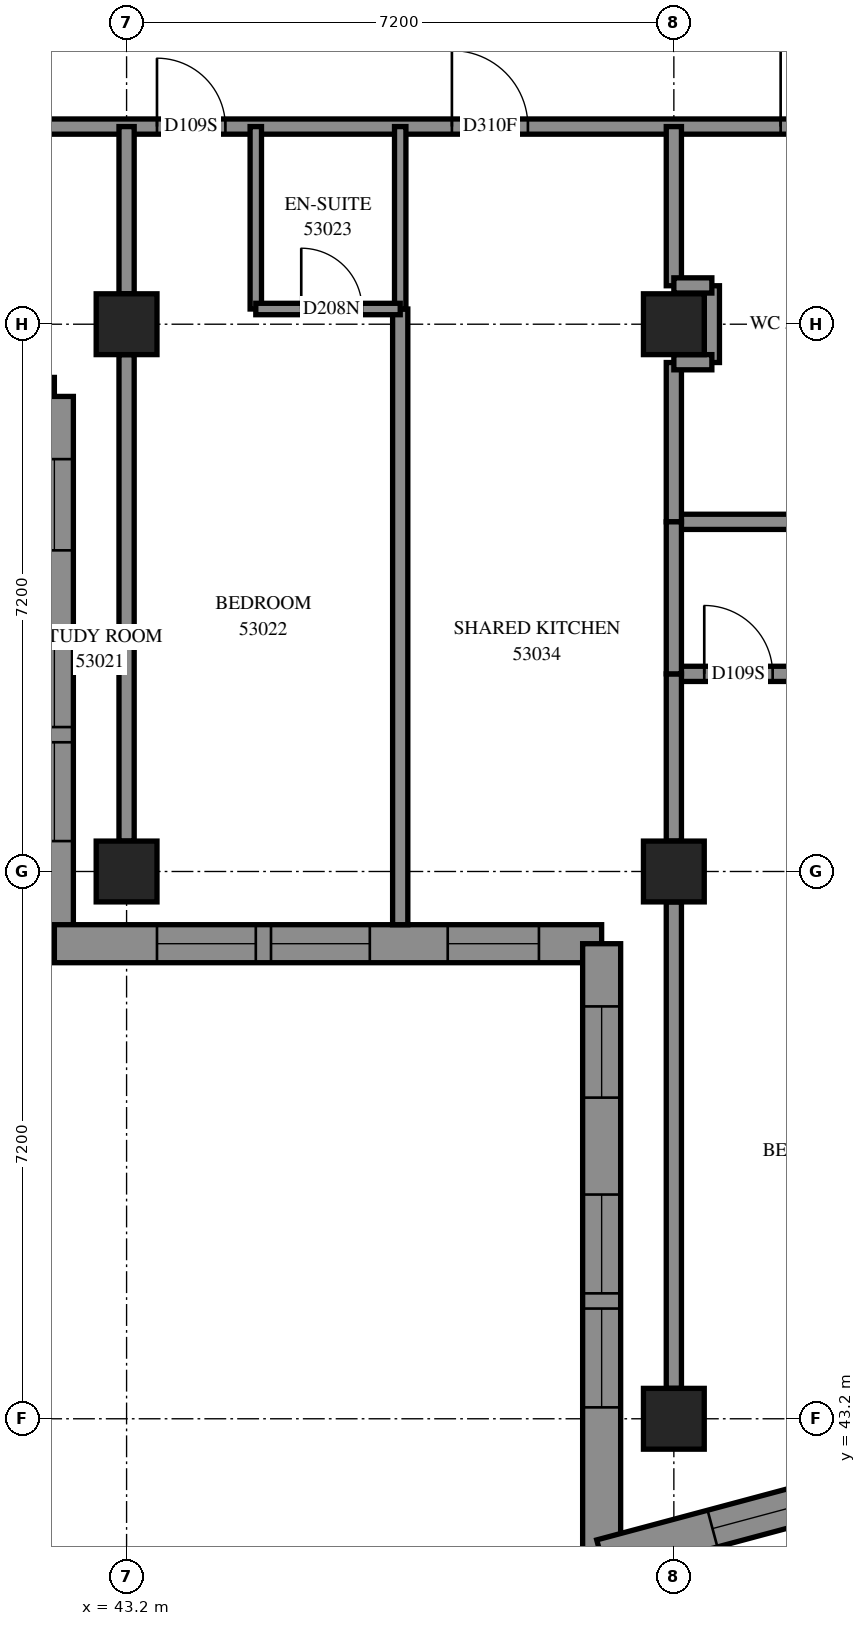
"""IFC4 building model, lengths in metres.
Left out: names, types, materials, properties, quantities, classifications, styles, units other than length and angle.
Written with IfcOpenShell. Run it as: python <this file> out.ifc"""

import sys

from ifc_helpers import new_model, si_unit, direction, frame, frame_2d, origin, origin_2d, place, context, subcontext, project, spatial, polyline, rectangle, outline, extrude, element, fill, save


model = new_model("IFC4")
c1 = context("Model", 3, precision=1e-05, world=origin(), true_north=direction((0.0, 1.0)))
c2 = subcontext(c1, "Body", "Model", "MODEL_VIEW")
j1 = project(units=[si_unit("LENGTHUNIT", "METRE"), si_unit("PLANEANGLEUNIT", "RADIAN")], contexts=[c1])
p1 = place(None, origin())
s1 = spatial("IfcSite", under=j1, at=p1, CompositionType="ELEMENT")
p2 = place(p1, origin())
s2 = spatial("IfcBuilding", under=s1, at=p2, CompositionType="ELEMENT")
p3 = place(p2, frame((0.0, 0.0, 196.4)))
s3 = spatial("IfcBuildingStorey", under=s2, at=p3, CompositionType="ELEMENT", Elevation=196.4)
for number, where, z_axis, x_axis in (
    (1, (43.2, 50.4, 0.0), (0.0, 0.0, 1.0), (1.0, 0.0, 0.0)),
    (2, (43.2, 57.6, 0.0), (0.0, 0.0, 1.0), (1.0, 0.0, 0.0)),
    (3, (50.4, 43.2, 0.0), (0.0, 0.0, 1.0), (1.0, 0.0, 0.0)),
    (4, (50.4, 50.4, 0.0), (0.0, 0.0, 1.0), (1.0, 0.0, 0.0)),
    (5, (50.4, 57.6, 0.0), (0.0, 0.0, 1.0), (1.0, 0.0, 0.0)),
):
    element("IfcColumn", number, at=place(p3, frame(where, z_axis=z_axis, x_axis=x_axis)), inside=s3, PredefinedType="COLUMN", context=c2, shape_type="SweptSolid", body=[
        extrude(rectangle(XDim=0.8, YDim=0.8, at=origin_2d()), origin(), (0.0, 0.0, 1.0), 3.1),
    ])
p4 = place(p3, frame((35.05, 56.65, 0.0), z_axis=(0.0, 0.0, 1.0), x_axis=(1.0, 0.0, 0.0)))
e6 = element("IfcWall", 6, at=p4, inside=s3, PredefinedType="SOLIDWALL", context=c2, shape_type="SweptSolid", body=[
    extrude(outline(polyline([(-0.25, -0.25), (6.95, -0.25), (7.45, 0.25), (0.25, 0.25), (-0.25, -0.25)])), origin(), (0.0, 0.0, 1.0), 3.1),
])
p5 = place(p4, frame((1.35, 0.0, 0.45)))
e7 = element("IfcOpeningElement", 7, at=p5, cuts=e6, PredefinedType="OPENING", context=c2, shape_type="SweptSolid", body=[
    extrude(rectangle(XDim=1.3, YDim=2.5, at=frame_2d((0.65, 1.25))), frame((0.0, 0.26, 0.0), z_axis=(0.0, -1.0, 0.0), x_axis=(1.0, 0.0, 0.0)), (0.0, 0.0, 1.0), 0.52),
])
p6 = place(p4, frame((2.85, 0.0, 0.45)))
e8 = element("IfcOpeningElement", 8, at=p6, cuts=e6, PredefinedType="OPENING", context=c2, shape_type="SweptSolid", body=[
    extrude(rectangle(XDim=1.3, YDim=2.5, at=frame_2d((0.65, 1.25))), frame((0.0, 0.26, 0.0), z_axis=(0.0, -1.0, 0.0), x_axis=(1.0, 0.0, 0.0)), (0.0, 0.0, 1.0), 0.52),
])
p7 = place(p4, frame((5.175, 0.0, 0.45)))
e9 = element("IfcOpeningElement", 9, at=p7, cuts=e6, PredefinedType="OPENING", context=c2, shape_type="SweptSolid", body=[
    extrude(rectangle(XDim=1.2, YDim=2.5, at=frame_2d((0.6, 1.25))), frame((0.0, 0.26, 0.0), z_axis=(0.0, -1.0, 0.0), x_axis=(1.0, 0.0, 0.0)), (0.0, 0.0, 1.0), 0.52),
])
p8 = place(p3, frame((42.25, 56.65, 0.0), z_axis=(0.0, 0.0, 1.0), x_axis=(0.0, -1.0, 0.0)))
e10 = element("IfcWall", 10, at=p8, inside=s3, PredefinedType="SOLIDWALL", context=c2, shape_type="SweptSolid", body=[
    extrude(outline(polyline([(0.25, -0.25), (7.45, -0.25), (6.95, 0.25), (-0.25, 0.25), (0.25, -0.25)])), origin(), (0.0, 0.0, 1.0), 3.1),
])
p9 = place(p8, frame((3.05, 0.0, 0.45)))
e11 = element("IfcOpeningElement", 11, at=p9, cuts=e10, PredefinedType="OPENING", context=c2, shape_type="SweptSolid", body=[
    extrude(rectangle(XDim=1.3, YDim=2.5, at=frame_2d((0.65, 1.25))), frame((0.0, 0.26, 0.0), z_axis=(0.0, -1.0, 0.0), x_axis=(1.0, 0.0, 0.0)), (0.0, 0.0, 1.0), 0.52),
])
p10 = place(p8, frame((4.55, 0.0, 0.45)))
e12 = element("IfcOpeningElement", 12, at=p10, cuts=e10, PredefinedType="OPENING", context=c2, shape_type="SweptSolid", body=[
    extrude(rectangle(XDim=1.3, YDim=2.5, at=frame_2d((0.65, 1.25))), frame((0.0, 0.26, 0.0), z_axis=(0.0, -1.0, 0.0), x_axis=(1.0, 0.0, 0.0)), (0.0, 0.0, 1.0), 0.52),
])
p11 = place(p8, frame((0.825, 0.0, 0.45)))
e13 = element("IfcOpeningElement", 13, at=p11, cuts=e10, PredefinedType="OPENING", context=c2, shape_type="SweptSolid", body=[
    extrude(rectangle(XDim=1.2, YDim=2.5, at=frame_2d((0.6, 1.25))), frame((0.0, 0.26, 0.0), z_axis=(0.0, -1.0, 0.0), x_axis=(1.0, 0.0, 0.0)), (0.0, 0.0, 1.0), 0.52),
])
p12 = place(p3, frame((42.25, 49.45, 0.0), z_axis=(0.0, 0.0, 1.0), x_axis=(1.0, 0.0, 0.0)))
e14 = element("IfcWall", 14, at=p12, inside=s3, PredefinedType="SOLIDWALL", context=c2, shape_type="SweptSolid", body=[
    extrude(outline(polyline([(-0.25, -0.25), (6.95, -0.25), (7.45, 0.25), (0.25, 0.25), (-0.25, -0.25)])), origin(), (0.0, 0.0, 1.0), 3.1),
])
p13 = place(p12, frame((1.35, 0.0, 0.45)))
e15 = element("IfcOpeningElement", 15, at=p13, cuts=e14, PredefinedType="OPENING", context=c2, shape_type="SweptSolid", body=[
    extrude(rectangle(XDim=1.3, YDim=2.5, at=frame_2d((0.65, 1.25))), frame((0.0, 0.26, 0.0), z_axis=(0.0, -1.0, 0.0), x_axis=(1.0, 0.0, 0.0)), (0.0, 0.0, 1.0), 0.52),
])
p14 = place(p12, frame((2.85, 0.0, 0.45)))
e16 = element("IfcOpeningElement", 16, at=p14, cuts=e14, PredefinedType="OPENING", context=c2, shape_type="SweptSolid", body=[
    extrude(rectangle(XDim=1.3, YDim=2.5, at=frame_2d((0.65, 1.25))), frame((0.0, 0.26, 0.0), z_axis=(0.0, -1.0, 0.0), x_axis=(1.0, 0.0, 0.0)), (0.0, 0.0, 1.0), 0.52),
])
p15 = place(p12, frame((5.175, 0.0, 0.45)))
e17 = element("IfcOpeningElement", 17, at=p15, cuts=e14, PredefinedType="OPENING", context=c2, shape_type="SweptSolid", body=[
    extrude(rectangle(XDim=1.2, YDim=2.5, at=frame_2d((0.6, 1.25))), frame((0.0, 0.26, 0.0), z_axis=(0.0, -1.0, 0.0), x_axis=(1.0, 0.0, 0.0)), (0.0, 0.0, 1.0), 0.52),
])
p16 = place(p3, frame((49.45, 49.45, 0.0), z_axis=(0.0, 0.0, 1.0), x_axis=(0.0, -1.0, 0.0)))
e18 = element("IfcWall", 18, at=p16, inside=s3, PredefinedType="SOLIDWALL", context=c2, shape_type="SweptSolid", body=[
    extrude(outline(polyline([(0.25, -0.25), (8.411, -0.25), (7.76, 0.25), (-0.25, 0.25), (0.25, -0.25)])), origin(), (0.0, 0.0, 1.0), 3.1),
])
p17 = place(p16, frame((3.3, 0.0, 0.45)))
e19 = element("IfcOpeningElement", 19, at=p17, cuts=e18, PredefinedType="OPENING", context=c2, shape_type="SweptSolid", body=[
    extrude(rectangle(XDim=1.3, YDim=2.5, at=frame_2d((0.65, 1.25))), frame((0.0, 0.26, 0.0), z_axis=(0.0, -1.0, 0.0), x_axis=(1.0, 0.0, 0.0)), (0.0, 0.0, 1.0), 0.52),
])
p18 = place(p16, frame((4.8, 0.0, 0.45)))
e20 = element("IfcOpeningElement", 20, at=p18, cuts=e18, PredefinedType="OPENING", context=c2, shape_type="SweptSolid", body=[
    extrude(rectangle(XDim=1.3, YDim=2.5, at=frame_2d((0.65, 1.25))), frame((0.0, 0.26, 0.0), z_axis=(0.0, -1.0, 0.0), x_axis=(1.0, 0.0, 0.0)), (0.0, 0.0, 1.0), 0.52),
])
p19 = place(p16, frame((0.825, 0.0, 0.45)))
e21 = element("IfcOpeningElement", 21, at=p19, cuts=e18, PredefinedType="OPENING", context=c2, shape_type="SweptSolid", body=[
    extrude(rectangle(XDim=1.2, YDim=2.5, at=frame_2d((0.6, 1.25))), frame((0.0, 0.26, 0.0), z_axis=(0.0, -1.0, 0.0), x_axis=(1.0, 0.0, 0.0)), (0.0, 0.0, 1.0), 0.52),
])
p20 = place(p3, frame((49.45, 41.365, 0.0), z_axis=(0.0, 0.0, 1.0), x_axis=(0.9659803862, 0.2586153388, 0.0)))
e22 = element("IfcWall", 22, at=p20, inside=s3, PredefinedType="SOLIDWALL", context=c2, shape_type="SweptSolid", body=[
    extrude(outline(polyline([(-0.326, -0.25), (3.39, -0.25), (3.482, 0.25), (0.326, 0.25), (-0.326, -0.25)])), origin(), (0.0, 0.0, 1.0), 3.1),
])
p21 = place(p20, frame((1.51, 0.0, 0.45)))
e23 = element("IfcOpeningElement", 23, at=p21, cuts=e22, PredefinedType="OPENING", context=c2, shape_type="SweptSolid", body=[
    extrude(rectangle(XDim=1.2, YDim=2.5, at=frame_2d((0.6, 1.25))), frame((0.0, 0.26, 0.0), z_axis=(0.0, -1.0, 0.0), x_axis=(1.0, 0.0, 0.0)), (0.0, 0.0, 1.0), 0.52),
])
p22 = place(p3, frame((36.0, 60.2, 0.0), z_axis=(0.0, 0.0, 1.0), x_axis=(1.0, 0.0, 0.0)))
e24 = element("IfcWall", 24, at=p22, inside=s3, PredefinedType="PARTITIONING", context=c2, shape_type="SweptSolid", body=[
    extrude(rectangle(XDim=17.0, YDim=0.2, at=frame_2d((8.5, 0.0))), origin(), (0.0, 0.0, 1.0), 3.1),
])
p23 = place(p22, frame((4.125, 0.0, 0.0)))
e25 = element("IfcOpeningElement", 25, at=p23, cuts=e24, PredefinedType="OPENING", context=c2, shape_type="SweptSolid", body=[
    extrude(rectangle(XDim=1.0, YDim=2.1, at=frame_2d((0.5, 1.05))), frame((0.0, 0.11, 0.0), z_axis=(0.0, -1.0, 0.0), x_axis=(1.0, 0.0, 0.0)), (0.0, 0.0, 1.0), 0.22),
])
p24 = place(p22, frame((7.6, 0.0, 0.0)))
e26 = element("IfcOpeningElement", 26, at=p24, cuts=e24, PredefinedType="OPENING", context=c2, shape_type="SweptSolid", body=[
    extrude(rectangle(XDim=0.9, YDim=2.1, at=frame_2d((0.45, 1.05))), frame((0.0, 0.11, 0.0), z_axis=(0.0, -1.0, 0.0), x_axis=(1.0, 0.0, 0.0)), (0.0, 0.0, 1.0), 0.22),
])
p25 = place(p22, frame((11.48, 0.0, 0.0)))
e27 = element("IfcOpeningElement", 27, at=p25, cuts=e24, PredefinedType="OPENING", context=c2, shape_type="SweptSolid", body=[
    extrude(rectangle(XDim=1.0, YDim=2.1, at=frame_2d((0.5, 1.05))), frame((0.0, 0.11, 0.0), z_axis=(0.0, -1.0, 0.0), x_axis=(1.0, 0.0, 0.0)), (0.0, 0.0, 1.0), 0.22),
])
p26 = place(p22, frame((15.805, 0.0, 0.0)))
e28 = element("IfcOpeningElement", 28, at=p26, cuts=e24, PredefinedType="OPENING", context=c2, shape_type="SweptSolid", body=[
    extrude(rectangle(XDim=1.0, YDim=2.1, at=frame_2d((0.5, 1.05))), frame((0.0, 0.11, 0.0), z_axis=(0.0, -1.0, 0.0), x_axis=(1.0, 0.0, 0.0)), (0.0, 0.0, 1.0), 0.22),
])
p27 = place(p3, frame((46.8, 49.7, 0.0), z_axis=(0.0, 0.0, 1.0), x_axis=(0.0, 1.0, 0.0)))
e29 = element("IfcWall", 29, at=p27, inside=s3, PredefinedType="PARTITIONING", context=c2, shape_type="SweptSolid", body=[
    extrude(rectangle(XDim=8.1, YDim=0.2, at=frame_2d((4.05, 0.0))), origin(), (0.0, 0.0, 1.0), 3.1),
])
for number, where, z_axis, x_axis in (
    (30, (43.2, 50.8, 0.0), (0.0, 0.0, 1.0), (0.0, 1.0, 0.0)),
    (31, (50.4, 43.6, 0.0), (0.0, 0.0, 1.0), (0.0, 1.0, 0.0)),
):
    element("IfcWall", number, at=place(p3, frame(where, z_axis=z_axis, x_axis=x_axis)), inside=s3, PredefinedType="PARTITIONING", context=c2, shape_type="SweptSolid", body=[
        extrude(rectangle(XDim=6.4, YDim=0.2, at=frame_2d((3.2, 0.0))), origin(), (0.0, 0.0, 1.0), 2.6),
    ])
p28 = place(p3, frame((50.4, 53.0, 0.0), z_axis=(0.0, 0.0, 1.0), x_axis=(1.0, 0.0, 0.0)))
e32 = element("IfcWall", 32, at=p28, inside=s3, PredefinedType="PARTITIONING", context=c2, shape_type="SweptSolid", body=[
    extrude(rectangle(XDim=5.2, YDim=0.2, at=frame_2d((2.6, 0.0))), origin(), (0.0, 0.0, 1.0), 3.1),
])
p29 = place(p28, frame((0.4, 0.0, 0.0)))
e33 = element("IfcOpeningElement", 33, at=p29, cuts=e32, PredefinedType="OPENING", context=c2, shape_type="SweptSolid", body=[
    extrude(rectangle(XDim=0.9, YDim=2.1, at=frame_2d((0.45, 1.05))), frame((0.0, 0.11, 0.0), z_axis=(0.0, -1.0, 0.0), x_axis=(1.0, 0.0, 0.0)), (0.0, 0.0, 1.0), 0.22),
])
p30 = place(p28, frame((3.946, 0.0, 0.0)))
e34 = element("IfcOpeningElement", 34, at=p30, cuts=e32, PredefinedType="OPENING", context=c2, shape_type="SweptSolid", body=[
    extrude(rectangle(XDim=1.0, YDim=2.1, at=frame_2d((0.5, 1.05))), frame((0.0, 0.11, 0.0), z_axis=(0.0, -1.0, 0.0), x_axis=(1.0, 0.0, 0.0)), (0.0, 0.0, 1.0), 0.22),
])
p31 = place(p3, frame((50.4, 55.0, 0.0), z_axis=(0.0, 0.0, 1.0), x_axis=(1.0, 0.0, 0.0)))
e35 = element("IfcWall", 35, at=p31, inside=s3, PredefinedType="PARTITIONING", context=c2, shape_type="SweptSolid", body=[
    extrude(rectangle(XDim=2.6, YDim=0.2, at=frame_2d((1.3, 0.0))), origin(), (0.0, 0.0, 1.0), 3.1),
])
for number, where, z_axis, x_axis in (
    (36, (44.9, 57.8, 0.0), (0.0, 0.0, 1.0), (0.0, 1.0, 0.0)),
    (37, (46.8, 57.8, 0.0), (0.0, 0.0, 1.0), (0.0, 1.0, 0.0)),
):
    element("IfcWall", number, at=place(p3, frame(where, z_axis=z_axis, x_axis=x_axis)), inside=s3, PredefinedType="PARTITIONING", context=c2, shape_type="SweptSolid", body=[
        extrude(rectangle(XDim=2.4, YDim=0.15, at=frame_2d((1.2, 0.0))), origin(), (0.0, 0.0, 1.0), 3.1),
    ])
for number, where, z_axis, x_axis in (
    (38, (43.2, 58.0, 0.0), (0.0, 0.0, 1.0), (0.0, 1.0, 0.0)),
    (39, (50.4, 50.8, 0.0), (0.0, 0.0, 1.0), (0.0, 1.0, 0.0)),
):
    element("IfcWall", number, at=place(p3, frame(where, z_axis=z_axis, x_axis=x_axis)), inside=s3, PredefinedType="PARTITIONING", context=c2, shape_type="SweptSolid", body=[
        extrude(rectangle(XDim=2.2, YDim=0.2, at=frame_2d((1.1, 0.0))), origin(), (0.0, 0.0, 1.0), 3.1),
    ])
p32 = place(p3, frame((50.4, 55.0, 0.0), z_axis=(0.0, 0.0, 1.0), x_axis=(0.0, 1.0, 0.0)))
e40 = element("IfcWall", 40, at=p32, inside=s3, PredefinedType="PARTITIONING", context=c2, shape_type="SweptSolid", body=[
    extrude(rectangle(XDim=2.096, YDim=0.2, at=frame_2d((1.048, 0.0))), origin(), (0.0, 0.0, 1.0), 3.1),
])
p33 = place(p3, frame((50.4, 58.106, 0.0), z_axis=(0.0, 0.0, 1.0), x_axis=(0.0, 1.0, 0.0)))
e41 = element("IfcWall", 41, at=p33, inside=s3, PredefinedType="PARTITIONING", context=c2, shape_type="SweptSolid", body=[
    extrude(rectangle(XDim=2.094, YDim=0.2, at=frame_2d((1.047, 0.0))), origin(), (0.0, 0.0, 1.0), 3.1),
])
p34 = place(p3, frame((50.4, 53.0, 0.0), z_axis=(0.0, 0.0, 1.0), x_axis=(0.0, 1.0, 0.0)))
e42 = element("IfcWall", 42, at=p34, inside=s3, PredefinedType="PARTITIONING", context=c2, shape_type="SweptSolid", body=[
    extrude(rectangle(XDim=2.0, YDim=0.2, at=frame_2d((1.0, 0.0))), origin(), (0.0, 0.0, 1.0), 3.1),
])
p35 = place(p3, frame((44.9, 57.8, 0.0), z_axis=(0.0, 0.0, 1.0), x_axis=(1.0, 0.0, 0.0)))
e43 = element("IfcWall", 43, at=p35, inside=s3, PredefinedType="PARTITIONING", context=c2, shape_type="SweptSolid", body=[
    extrude(rectangle(XDim=1.9, YDim=0.15, at=frame_2d((0.95, 0.0))), origin(), (0.0, 0.0, 1.0), 3.1),
])
p36 = place(p35, frame((0.598, 0.0, 0.0)))
e44 = element("IfcOpeningElement", 44, at=p36, cuts=e43, PredefinedType="OPENING", context=c2, shape_type="SweptSolid", body=[
    extrude(rectangle(XDim=0.8, YDim=2.1, at=frame_2d((0.4, 1.05))), frame((0.0, 0.085, 0.0), z_axis=(0.0, -1.0, 0.0), x_axis=(1.0, 0.0, 0.0)), (0.0, 0.0, 1.0), 0.17),
])
p37 = place(p3, frame((50.9, 57.096, 0.0), z_axis=(0.0, 0.0, 1.0), x_axis=(0.0, 1.0, 0.0)))
e45 = element("IfcWall", 45, at=p37, inside=s3, PredefinedType="PARTITIONING", context=c2, shape_type="SweptSolid", body=[
    extrude(rectangle(XDim=1.01, YDim=0.2, at=frame_2d((0.505, 0.0))), origin(), (0.0, 0.0, 1.0), 3.1),
])
for number, where, z_axis, x_axis in (
    (46, (50.4, 58.11, 0.0), (0.0, 0.0, 1.0), (1.0, 0.0, 0.0)),
    (47, (50.4, 57.1, 0.0), (0.0, 0.0, 1.0), (1.0, 0.0, 0.0)),
):
    element("IfcWall", number, at=place(p3, frame(where, z_axis=z_axis, x_axis=x_axis)), inside=s3, PredefinedType="PARTITIONING", context=c2, shape_type="SweptSolid", body=[
        extrude(rectangle(XDim=0.5, YDim=0.2, at=frame_2d((0.25, 0.0))), origin(), (0.0, 0.0, 1.0), 3.1),
    ])
p38 = place(p9, origin())
e48 = element("IfcWindow", 48, at=p38, inside=s3, PartitioningType="SINGLE_PANEL", PredefinedType="WINDOW", context=c2, shape_type="SweptSolid", body=[
    extrude(rectangle(XDim=1.3, YDim=2.5, at=frame_2d((0.65, 1.25))), frame((0.0, 0.18, 0.0), z_axis=(0.0, -1.0, 0.0), x_axis=(1.0, 0.0, 0.0)), (0.0, 0.0, 1.0), 0.06),
])
fill(e11, e48)
p39 = place(p10, origin())
e49 = element("IfcWindow", 49, at=p39, inside=s3, PartitioningType="SINGLE_PANEL", PredefinedType="WINDOW", context=c2, shape_type="SweptSolid", body=[
    extrude(rectangle(XDim=1.3, YDim=2.5, at=frame_2d((0.65, 1.25))), frame((0.0, 0.18, 0.0), z_axis=(0.0, -1.0, 0.0), x_axis=(1.0, 0.0, 0.0)), (0.0, 0.0, 1.0), 0.06),
])
fill(e12, e49)
p40 = place(p11, origin())
e50 = element("IfcWindow", 50, at=p40, inside=s3, PartitioningType="SINGLE_PANEL", PredefinedType="WINDOW", context=c2, shape_type="SweptSolid", body=[
    extrude(rectangle(XDim=1.2, YDim=2.5, at=frame_2d((0.6, 1.25))), frame((0.0, 0.18, 0.0), z_axis=(0.0, -1.0, 0.0), x_axis=(1.0, 0.0, 0.0)), (0.0, 0.0, 1.0), 0.06),
])
fill(e13, e50)
p41 = place(p13, origin())
e51 = element("IfcWindow", 51, at=p41, inside=s3, PartitioningType="SINGLE_PANEL", PredefinedType="WINDOW", context=c2, shape_type="SweptSolid", body=[
    extrude(rectangle(XDim=1.3, YDim=2.5, at=frame_2d((0.65, 1.25))), frame((0.0, 0.18, 0.0), z_axis=(0.0, -1.0, 0.0), x_axis=(1.0, 0.0, 0.0)), (0.0, 0.0, 1.0), 0.06),
])
fill(e15, e51)
p42 = place(p14, origin())
e52 = element("IfcWindow", 52, at=p42, inside=s3, PartitioningType="SINGLE_PANEL", PredefinedType="WINDOW", context=c2, shape_type="SweptSolid", body=[
    extrude(rectangle(XDim=1.3, YDim=2.5, at=frame_2d((0.65, 1.25))), frame((0.0, 0.18, 0.0), z_axis=(0.0, -1.0, 0.0), x_axis=(1.0, 0.0, 0.0)), (0.0, 0.0, 1.0), 0.06),
])
fill(e16, e52)
p43 = place(p15, origin())
e53 = element("IfcWindow", 53, at=p43, inside=s3, PartitioningType="SINGLE_PANEL", PredefinedType="WINDOW", context=c2, shape_type="SweptSolid", body=[
    extrude(rectangle(XDim=1.2, YDim=2.5, at=frame_2d((0.6, 1.25))), frame((0.0, 0.18, 0.0), z_axis=(0.0, -1.0, 0.0), x_axis=(1.0, 0.0, 0.0)), (0.0, 0.0, 1.0), 0.06),
])
fill(e17, e53)
p44 = place(p17, origin())
e54 = element("IfcWindow", 54, at=p44, inside=s3, PartitioningType="SINGLE_PANEL", PredefinedType="WINDOW", context=c2, shape_type="SweptSolid", body=[
    extrude(rectangle(XDim=1.3, YDim=2.5, at=frame_2d((0.65, 1.25))), frame((0.0, 0.18, 0.0), z_axis=(0.0, -1.0, 0.0), x_axis=(1.0, 0.0, 0.0)), (0.0, 0.0, 1.0), 0.06),
])
fill(e19, e54)
p45 = place(p18, origin())
e55 = element("IfcWindow", 55, at=p45, inside=s3, PartitioningType="SINGLE_PANEL", PredefinedType="WINDOW", context=c2, shape_type="SweptSolid", body=[
    extrude(rectangle(XDim=1.3, YDim=2.5, at=frame_2d((0.65, 1.25))), frame((0.0, 0.18, 0.0), z_axis=(0.0, -1.0, 0.0), x_axis=(1.0, 0.0, 0.0)), (0.0, 0.0, 1.0), 0.06),
])
fill(e20, e55)
p46 = place(p19, origin())
e56 = element("IfcWindow", 56, at=p46, inside=s3, PartitioningType="SINGLE_PANEL", PredefinedType="WINDOW", context=c2, shape_type="SweptSolid", body=[
    extrude(rectangle(XDim=1.2, YDim=2.5, at=frame_2d((0.6, 1.25))), frame((0.0, 0.18, 0.0), z_axis=(0.0, -1.0, 0.0), x_axis=(1.0, 0.0, 0.0)), (0.0, 0.0, 1.0), 0.06),
])
fill(e21, e56)
p47 = place(p21, origin())
e57 = element("IfcWindow", 57, at=p47, inside=s3, PartitioningType="SINGLE_PANEL", PredefinedType="WINDOW", context=c2, shape_type="SweptSolid", body=[
    extrude(rectangle(XDim=1.2, YDim=2.5, at=frame_2d((0.6, 1.25))), frame((0.0, 0.18, 0.0), z_axis=(0.0, -1.0, 0.0), x_axis=(1.0, 0.0, 0.0)), (0.0, 0.0, 1.0), 0.06),
])
fill(e23, e57)
p48 = place(p24, origin())
e58 = element("IfcDoor", 58, at=p48, inside=s3, OperationType="SINGLE_SWING_LEFT", PredefinedType="DOOR", context=c2, shape_type="SweptSolid", body=[
    extrude(rectangle(XDim=0.9, YDim=2.1, at=frame_2d((0.45, 1.05))), frame((0.0, 0.025, 0.0), z_axis=(0.0, -1.0, 0.0), x_axis=(1.0, 0.0, 0.0)), (0.0, 0.0, 1.0), 0.05),
])
fill(e26, e58)
p49 = place(p36, origin())
e59 = element("IfcDoor", 59, at=p49, inside=s3, OperationType="SINGLE_SWING_RIGHT", PredefinedType="DOOR", context=c2, shape_type="SweptSolid", body=[
    extrude(rectangle(XDim=0.8, YDim=2.1, at=frame_2d((0.4, 1.05))), frame((0.0, 0.025, 0.0), z_axis=(0.0, -1.0, 0.0), x_axis=(1.0, 0.0, 0.0)), (0.0, 0.0, 1.0), 0.05),
])
fill(e44, e59)
p50 = place(p25, origin())
e60 = element("IfcDoor", 60, at=p50, inside=s3, OperationType="SINGLE_SWING_RIGHT", PredefinedType="DOOR", context=c2, shape_type="SweptSolid", body=[
    extrude(rectangle(XDim=1.0, YDim=2.1, at=frame_2d((0.5, 1.05))), frame((0.0, 0.025, 0.0), z_axis=(0.0, -1.0, 0.0), x_axis=(1.0, 0.0, 0.0)), (0.0, 0.0, 1.0), 0.05),
])
fill(e27, e60)
p51 = place(p26, origin())
e61 = element("IfcDoor", 61, at=p51, inside=s3, OperationType="SINGLE_SWING_LEFT", PredefinedType="DOOR", context=c2, shape_type="SweptSolid", body=[
    extrude(rectangle(XDim=1.0, YDim=2.1, at=frame_2d((0.5, 1.05))), frame((0.0, 0.025, 0.0), z_axis=(0.0, -1.0, 0.0), x_axis=(1.0, 0.0, 0.0)), (0.0, 0.0, 1.0), 0.05),
])
fill(e28, e61)
p52 = place(p29, origin())
e62 = element("IfcDoor", 62, at=p52, inside=s3, OperationType="SINGLE_SWING_LEFT", PredefinedType="DOOR", context=c2, shape_type="SweptSolid", body=[
    extrude(rectangle(XDim=0.9, YDim=2.1, at=frame_2d((0.45, 1.05))), frame((0.0, 0.025, 0.0), z_axis=(0.0, -1.0, 0.0), x_axis=(1.0, 0.0, 0.0)), (0.0, 0.0, 1.0), 0.05),
])
fill(e33, e62)
save(model, sys.argv[1])
